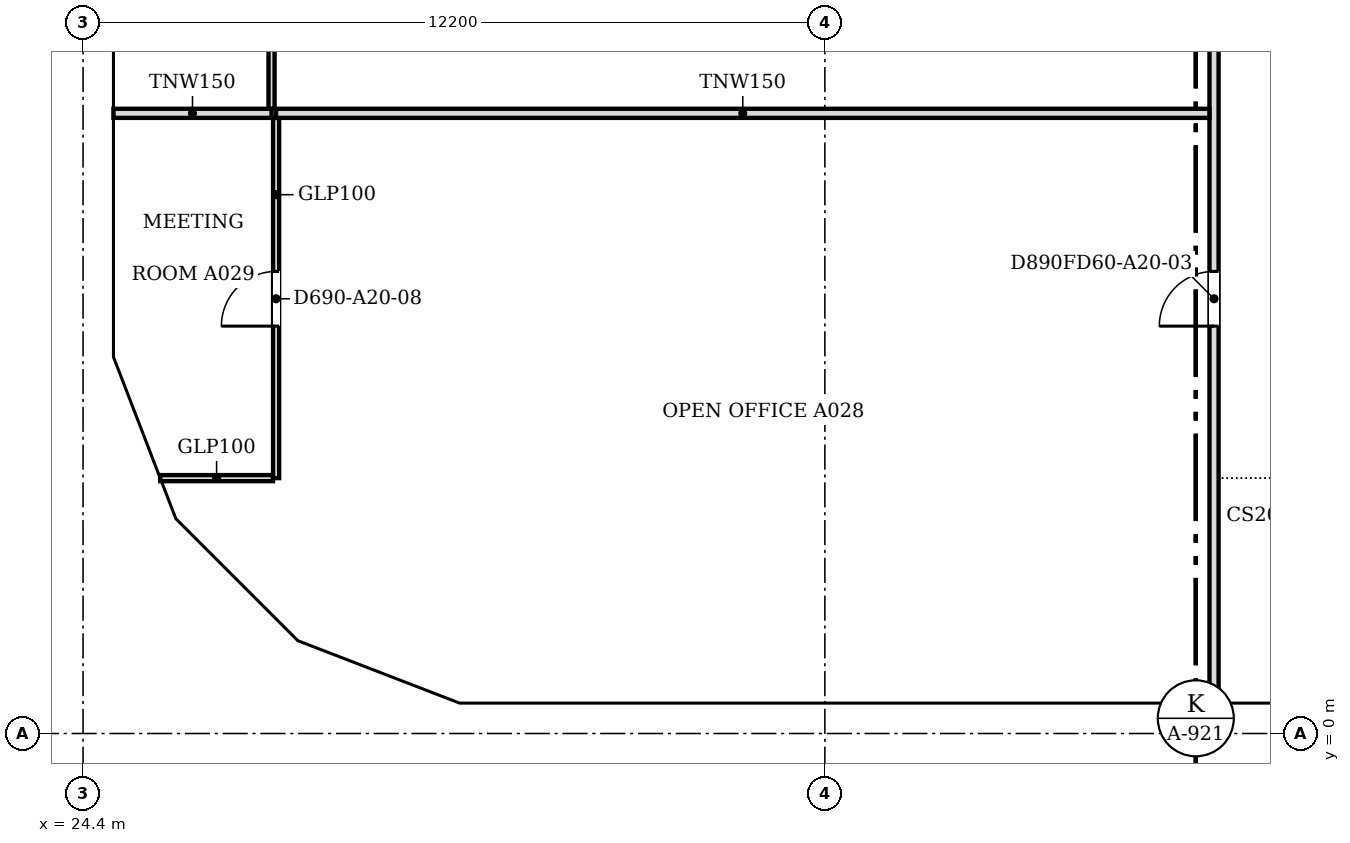
"""IFC4 building model, lengths in metres.
Left out: names, types, materials, properties, quantities, classifications, styles, units other than length and angle.
Written with IfcOpenShell. Run it as: python <this file> out.ifc"""

import sys

from ifc_helpers import new_model, si_unit, direction, frame, frame_2d, origin, place, context, subcontext, project, spatial, polyline, rectangle, outline, extrude, faceted_brep, source, transform, mapped, element, fill, save


model = new_model("IFC4")
c1 = context("Model", 3, precision=1e-05, world=origin(), true_north=direction((0.0, 1.0)))
c2 = subcontext(c1, "Body", "Model", "MODEL_VIEW")
j1 = project(units=[si_unit("LENGTHUNIT", "METRE"), si_unit("PLANEANGLEUNIT", "RADIAN")], contexts=[c1])
p1 = place(None, origin())
s1 = spatial("IfcSite", under=j1, at=p1, CompositionType="ELEMENT")
p2 = place(p1, origin())
s2 = spatial("IfcBuilding", under=s1, at=p2, CompositionType="ELEMENT")
p3 = place(p2, frame((0.0, 0.0, 220.7)))
s3 = spatial("IfcBuildingStorey", under=s2, at=p3, CompositionType="ELEMENT", Elevation=220.7)
m1 = source(origin(), c2, "Body", "Brep", [
    faceted_brep([(0.047, -0.25, 0.0), (3.05, -0.25, 3.8), (0.047, -0.25, 7.6), (0.0, -0.25, 7.54), (0.0, -0.25, 0.06), (0.093, 0.25, 7.541), (3.05, 0.25, 3.8), (0.093, 0.25, 0.059), (0.047, 0.0, 0.0), (0.047, 0.0, 7.6)], [[[0, 1, 2, 3, 4]], [[5, 6, 7]], [[7, 6, 1, 0, 8]], [[6, 5, 9, 2, 1]], [[3, 2, 9]], [[8, 0, 4]], [[7, 8, 4, 3, 9, 5]]]),
])
p4 = place(p3, frame((30.5, 0.25, -3.8), z_axis=(0.0, 0.0, 1.0), x_axis=(1.0, 0.0, 0.0)))
e1 = element("IfcWall", 1, at=p4, inside=s3, PredefinedType="SOLIDWALL", context=c2, shape_type="MappedRepresentation", body=[
    mapped(m1, transform((0.0, 0.0, 0.0), scale=1.0)),
])
m2 = source(origin(), c2, "Body", "SweptSolid", [
    extrude(outline(polyline([(0.247, 0.656), (2.731, 3.8), (0.247, 6.944), (0.247, 0.656)])), frame((0.0, 0.26, 0.0), z_axis=(0.0, -1.0, 0.0), x_axis=(1.0, 0.0, 0.0)), (0.0, 0.0, 1.0), 0.52),
])
p5 = place(p4, origin())
e2 = element("IfcOpeningElement", 2, at=p5, cuts=e1, PredefinedType="OPENING", context=c2, shape_type="MappedRepresentation", body=[
    mapped(m2, transform((0.0, 0.0, 0.0), scale=1.0)),
])
m3 = source(origin(), c2, "Body", "Brep", [
    faceted_brep([(2.95, -0.25, 0.0), (2.997, -0.25, 0.059), (2.997, -0.25, 7.541), (2.95, -0.25, 7.6), (0.0, -0.25, 3.8), (0.053, 0.25, 3.868), (2.904, 0.25, 7.54), (2.904, 0.25, 0.06), (0.053, 0.25, 3.732), (2.95, 0.0, 0.0), (2.95, 0.0, 7.6), (0.0, 0.0, 3.8)], [[[0, 1, 2, 3, 4]], [[5, 6, 7, 8]], [[1, 0, 9]], [[10, 3, 2]], [[6, 5, 11, 4, 3, 10]], [[8, 7, 9, 0, 4, 11]], [[8, 11, 5]], [[1, 9, 7, 6, 10, 2]]]),
])
p6 = place(p3, frame((27.794, 1.312, -3.8), z_axis=(0.0, 0.0, 1.0), x_axis=(0.932973525033, -0.359944998003, 0.0)))
e3 = element("IfcWall", 3, at=p6, inside=s3, PredefinedType="SOLIDWALL", context=c2, shape_type="MappedRepresentation", body=[
    mapped(m3, transform((0.0, 0.0, 0.0), scale=1.0)),
])
m4 = source(origin(), c2, "Body", "SweptSolid", [
    extrude(outline(polyline([(2.75, 6.935), (0.316, 3.8), (2.75, 0.665), (2.75, 6.935)])), frame((0.0, 0.26, 0.0), z_axis=(0.0, -1.0, 0.0), x_axis=(1.0, 0.0, 0.0)), (0.0, 0.0, 1.0), 0.52),
])
p7 = place(p6, origin())
e4 = element("IfcOpeningElement", 4, at=p7, cuts=e3, PredefinedType="OPENING", context=c2, shape_type="MappedRepresentation", body=[
    mapped(m4, transform((0.0, 0.0, 0.0), scale=1.0)),
])
m5 = source(origin(), c2, "Body", "Brep", [
    faceted_brep([(3.05, -0.25, 0.0), (6.1, -0.25, 3.8), (6.1, -0.25, 3.8), (3.05, -0.25, 7.6), (0.0, -0.25, 3.8), (0.0, 0.25, 3.8), (3.05, 0.25, 7.6), (6.1, 0.25, 3.8), (6.1, 0.25, 3.8), (3.05, 0.25, 0.0)], [[[0, 1, 2, 3, 4]], [[5, 6, 7, 8, 9]], [[9, 8, 1, 0]], [[7, 6, 3, 2]], [[6, 5, 4, 3]], [[5, 9, 0, 4]], [[1, 8, 7, 2]]]),
])
p8 = place(p3, frame((33.55, 0.25, -3.8), z_axis=(0.0, 0.0, 1.0), x_axis=(1.0, 0.0, 0.0)))
e5 = element("IfcWall", 5, at=p8, inside=s3, PredefinedType="SOLIDWALL", context=c2, shape_type="MappedRepresentation", body=[
    mapped(m5, transform((0.0, 0.0, 0.0), scale=1.0)),
])
m6 = source(origin(), c2, "Body", "SweptSolid", [
    extrude(outline(polyline([(3.05, 0.399), (5.78, 3.8), (3.05, 7.201), (0.321, 3.8), (3.05, 0.399)])), frame((0.0, 0.26, 0.0), z_axis=(0.0, -1.0, 0.0), x_axis=(1.0, 0.0, 0.0)), (0.0, 0.0, 1.0), 0.52),
])
p9 = place(p8, origin())
e6 = element("IfcOpeningElement", 6, at=p9, cuts=e5, PredefinedType="OPENING", context=c2, shape_type="MappedRepresentation", body=[
    mapped(m6, transform((0.0, 0.0, 0.0), scale=1.0)),
])
m7 = source(origin(), c2, "Body", "SweptSolid", [
    extrude(outline(polyline([(3.05, 0.0), (6.1, 3.8), (3.05, 7.6), (0.0, 3.8), (3.05, 0.0)])), frame((0.0, 0.25, 0.0), z_axis=(0.0, -1.0, 0.0), x_axis=(1.0, 0.0, 0.0)), (0.0, 0.0, 1.0), 0.5),
])
p10 = place(p3, frame((39.65, 0.25, -3.8), z_axis=(0.0, 0.0, 1.0), x_axis=(1.0, 0.0, 0.0)))
e7 = element("IfcWall", 7, at=p10, inside=s3, PredefinedType="SOLIDWALL", context=c2, shape_type="MappedRepresentation", body=[
    mapped(m7, transform((0.0, 0.0, 0.0), scale=1.0)),
])
p11 = place(p10, origin())
e8 = element("IfcOpeningElement", 8, at=p11, cuts=e7, PredefinedType="OPENING", context=c2, shape_type="MappedRepresentation", body=[
    mapped(m6, transform((0.0, 0.0, 0.0), scale=1.0)),
])
m8 = source(origin(), c2, "Body", "Brep", [
    faceted_brep([(3.096, -0.25, 0.0), (6.1, -0.25, 3.8), (3.096, -0.25, 7.6), (0.047, -0.25, 3.857), (0.047, -0.25, 3.743), (0.0, 0.25, 3.8), (3.096, 0.25, 7.6), (6.053, 0.25, 3.859), (6.053, 0.25, 3.741), (3.096, 0.25, 0.0), (6.1, -0.0, 3.8), (0.0, 0.0, 3.8)], [[[0, 1, 2, 3, 4]], [[5, 6, 7, 8, 9]], [[9, 8, 10, 1, 0]], [[7, 6, 2, 1, 10]], [[6, 5, 11, 3, 2]], [[5, 9, 0, 4, 11]], [[11, 4, 3]], [[10, 8, 7]]]),
])
p12 = place(p3, frame((24.65, 12.247, -3.8), z_axis=(0.0, 0.0, 1.0), x_axis=(0.0, -1.0, 0.0)))
e9 = element("IfcWall", 9, at=p12, inside=s3, PredefinedType="SOLIDWALL", context=c2, shape_type="MappedRepresentation", body=[
    mapped(m8, transform((0.0, 0.0, 0.0), scale=1.0)),
])
m9 = source(origin(), c2, "Body", "SweptSolid", [
    extrude(outline(polyline([(3.094, 0.399), (5.781, 3.8), (3.094, 7.201), (0.323, 3.8), (3.094, 0.399)])), frame((0.0, 0.26, 0.0), z_axis=(0.0, -1.0, 0.0), x_axis=(1.0, 0.0, 0.0)), (0.0, 0.0, 1.0), 0.52),
])
p13 = place(p12, origin())
e10 = element("IfcOpeningElement", 10, at=p13, cuts=e9, PredefinedType="OPENING", context=c2, shape_type="MappedRepresentation", body=[
    mapped(m9, transform((0.0, 0.0, 0.0), scale=1.0)),
])
m10 = source(origin(), c2, "Body", "Brep", [
    faceted_brep([(2.95, -0.25, 0.0), (3.003, -0.25, 0.068), (3.003, -0.25, 7.532), (2.95, -0.25, 7.6), (0.0, -0.25, 3.8), (0.047, 0.25, 3.86), (2.898, 0.25, 7.532), (2.898, 0.25, 0.068), (0.047, 0.25, 3.74), (2.95, 0.0, 0.0), (2.95, 0.0, 7.6), (0.0, 0.0, 3.8)], [[[0, 1, 2, 3, 4]], [[5, 6, 7, 8]], [[1, 0, 9]], [[10, 3, 2]], [[6, 5, 11, 4, 3, 10]], [[8, 7, 9, 0, 4, 11]], [[8, 11, 5]], [[1, 9, 7, 6, 10, 2]]]),
])
p14 = place(p3, frame((24.65, 6.146, -3.8), z_axis=(0.0, 0.0, 1.0), x_axis=(0.359953949349, -0.932970071518, 0.0)))
e11 = element("IfcWall", 11, at=p14, inside=s3, PredefinedType="SOLIDWALL", context=c2, shape_type="MappedRepresentation", body=[
    mapped(m10, transform((0.0, 0.0, 0.0), scale=1.0)),
])
p15 = place(p14, origin())
e12 = element("IfcOpeningElement", 12, at=p15, cuts=e11, PredefinedType="OPENING", context=c2, shape_type="MappedRepresentation", body=[
    mapped(m4, transform((0.0, 0.0, 0.0), scale=1.0)),
])
m11 = source(origin(), c2, "Body", "Brep", [
    faceted_brep([(0.053, -0.25, 0.0), (2.997, -0.25, 3.8), (0.053, -0.25, 7.6), (0.0, -0.25, 7.532), (0.0, -0.25, 0.068), (0.106, 0.25, 7.532), (2.944, 0.25, 3.868), (2.944, 0.25, 3.732), (0.106, 0.25, 0.068), (2.997, 0.0, 3.8), (0.053, 0.0, 0.0), (0.053, 0.0, 7.6)], [[[0, 1, 2, 3, 4]], [[5, 6, 7, 8]], [[8, 7, 9, 1, 0, 10]], [[6, 5, 11, 2, 1, 9]], [[3, 2, 11]], [[10, 0, 4]], [[8, 10, 4, 3, 11, 5]], [[9, 7, 6]]]),
])
p16 = place(p3, frame((25.675, 3.431, -3.8), z_axis=(0.0, 0.0, 1.0), x_axis=(0.707106781187, -0.707106781187, 0.0)))
e13 = element("IfcWall", 13, at=p16, inside=s3, PredefinedType="SOLIDWALL", context=c2, shape_type="MappedRepresentation", body=[
    mapped(m11, transform((0.0, 0.0, 0.0), scale=1.0)),
])
m12 = source(origin(), c2, "Body", "SweptSolid", [
    extrude(outline(polyline([(0.253, 0.667), (2.681, 3.8), (0.253, 6.934), (0.253, 0.667)])), frame((0.0, 0.26, 0.0), z_axis=(0.0, -1.0, 0.0), x_axis=(1.0, 0.0, 0.0)), (0.0, 0.0, 1.0), 0.52),
])
p17 = place(p16, origin())
e14 = element("IfcOpeningElement", 14, at=p17, cuts=e13, PredefinedType="OPENING", context=c2, shape_type="MappedRepresentation", body=[
    mapped(m12, transform((0.0, 0.0, 0.0), scale=1.0)),
])
p18 = place(p2, frame((0.0, 0.0, 224.5)))
s4 = spatial("IfcBuildingStorey", under=s2, at=p18, CompositionType="ELEMENT", Elevation=224.5)
m13 = source(origin(), c2, "Body", "Brep", [
    faceted_brep([(3.003, -0.25, 0.0), (6.053, -0.25, 3.8), (3.003, -0.25, 7.6), (0.0, -0.25, 3.8), (0.047, 0.25, 3.859), (3.003, 0.25, 7.6), (6.053, 0.25, 3.8), (3.003, 0.25, 0.0), (0.047, 0.25, 3.741), (0.0, 0.0, 3.8)], [[[0, 1, 2, 3]], [[4, 5, 6, 7, 8]], [[7, 6, 1, 0]], [[6, 5, 2, 1]], [[5, 4, 9, 3, 2]], [[8, 7, 0, 3, 9]], [[8, 9, 4]]]),
])
p19 = place(p18, frame((30.547, 0.25, -3.8), z_axis=(0.0, 0.0, 1.0), x_axis=(1.0, 0.0, 0.0)))
e15 = element("IfcWall", 15, at=p19, inside=s4, PredefinedType="SOLIDWALL", context=c2, shape_type="MappedRepresentation", body=[
    mapped(m13, transform((0.0, 0.0, 0.0), scale=1.0)),
])
m14 = source(origin(), c2, "Body", "SweptSolid", [
    extrude(outline(polyline([(3.005, 0.401), (5.733, 3.8), (3.005, 7.199), (0.319, 3.8), (3.005, 0.401)])), frame((0.0, 0.26, 0.0), z_axis=(0.0, -1.0, 0.0), x_axis=(1.0, 0.0, 0.0)), (0.0, 0.0, 1.0), 0.52),
])
p20 = place(p19, origin())
e16 = element("IfcOpeningElement", 16, at=p20, cuts=e15, PredefinedType="OPENING", context=c2, shape_type="MappedRepresentation", body=[
    mapped(m14, transform((0.0, 0.0, 0.0), scale=1.0)),
])
p21 = place(p18, frame((36.6, 0.25, -3.8), z_axis=(0.0, 0.0, 1.0), x_axis=(1.0, 0.0, 0.0)))
e17 = element("IfcWall", 17, at=p21, inside=s4, PredefinedType="SOLIDWALL", context=c2, shape_type="MappedRepresentation", body=[
    mapped(m5, transform((0.0, 0.0, 0.0), scale=1.0)),
])
p22 = place(p21, origin())
e18 = element("IfcOpeningElement", 18, at=p22, cuts=e17, PredefinedType="OPENING", context=c2, shape_type="MappedRepresentation", body=[
    mapped(m6, transform((0.0, 0.0, 0.0), scale=1.0)),
])
p23 = place(p18, frame((42.7, 0.25, -3.8), z_axis=(0.0, 0.0, 1.0), x_axis=(1.0, 0.0, 0.0)))
e19 = element("IfcWall", 19, at=p23, inside=s4, PredefinedType="SOLIDWALL", context=c2, shape_type="MappedRepresentation", body=[
    mapped(m7, transform((0.0, 0.0, 0.0), scale=1.0)),
])
p24 = place(p23, origin())
e20 = element("IfcOpeningElement", 20, at=p24, cuts=e19, PredefinedType="OPENING", context=c2, shape_type="MappedRepresentation", body=[
    mapped(m6, transform((0.0, 0.0, 0.0), scale=1.0)),
])
m15 = source(origin(), c2, "Body", "Brep", [
    faceted_brep([(0.093, -0.25, 0.057), (3.143, -0.25, 3.8), (0.093, -0.25, 7.543), (0.0, 0.25, 7.544), (0.047, 0.25, 7.6), (3.143, 0.25, 3.8), (0.047, 0.25, 0.0), (0.0, 0.25, 0.056), (0.047, 0.0, 0.0), (0.047, 0.0, 7.6)], [[[0, 1, 2]], [[3, 4, 5, 6, 7]], [[6, 5, 1, 0, 8]], [[5, 4, 9, 2, 1]], [[4, 3, 9]], [[7, 6, 8]], [[7, 8, 0, 2, 9, 3]]]),
])
p25 = place(p18, frame((24.65, 12.293, -3.8), z_axis=(0.0, 0.0, 1.0), x_axis=(0.0, -1.0, 0.0)))
e21 = element("IfcWall", 21, at=p25, inside=s4, PredefinedType="SOLIDWALL", context=c2, shape_type="MappedRepresentation", body=[
    mapped(m15, transform((0.0, 0.0, 0.0), scale=1.0)),
])
m16 = source(origin(), c2, "Body", "SweptSolid", [
    extrude(outline(polyline([(0.247, 0.641), (2.821, 3.8), (0.247, 6.959), (0.247, 0.641)])), frame((0.0, 0.26, 0.0), z_axis=(0.0, -1.0, 0.0), x_axis=(1.0, 0.0, 0.0)), (0.0, 0.0, 1.0), 0.52),
])
p26 = place(p25, origin())
e22 = element("IfcOpeningElement", 22, at=p26, cuts=e21, PredefinedType="OPENING", context=c2, shape_type="MappedRepresentation", body=[
    mapped(m16, transform((0.0, 0.0, 0.0), scale=1.0)),
])
m17 = source(origin(), c2, "Body", "Brep", [
    faceted_brep([(3.003, -0.25, 0.0), (3.05, -0.25, 0.06), (3.05, -0.25, 7.54), (3.003, -0.25, 7.6), (0.0, -0.25, 3.8), (0.0, 0.25, 3.8), (2.957, 0.25, 7.541), (2.957, 0.25, 0.059), (3.003, 0.0, 0.0), (3.003, 0.0, 7.6)], [[[0, 1, 2, 3, 4]], [[5, 6, 7]], [[1, 0, 8]], [[9, 3, 2]], [[6, 5, 4, 3, 9]], [[5, 7, 8, 0, 4]], [[1, 8, 7, 6, 9, 2]]]),
])
p27 = place(p18, frame((24.65, 9.15, -3.8), z_axis=(0.0, 0.0, 1.0), x_axis=(0.0, -1.0, 0.0)))
e23 = element("IfcWall", 23, at=p27, inside=s4, PredefinedType="SOLIDWALL", context=c2, shape_type="MappedRepresentation", body=[
    mapped(m17, transform((0.0, 0.0, 0.0), scale=1.0)),
])
m18 = source(origin(), c2, "Body", "SweptSolid", [
    extrude(outline(polyline([(2.803, 6.944), (0.319, 3.8), (2.803, 0.656), (2.803, 6.944)])), frame((0.0, 0.26, 0.0), z_axis=(0.0, -1.0, 0.0), x_axis=(1.0, 0.0, 0.0)), (0.0, 0.0, 1.0), 0.52),
])
p28 = place(p27, origin())
e24 = element("IfcOpeningElement", 24, at=p28, cuts=e23, PredefinedType="OPENING", context=c2, shape_type="MappedRepresentation", body=[
    mapped(m18, transform((0.0, 0.0, 0.0), scale=1.0)),
])
m19 = source(origin(), c2, "Body", "Brep", [
    faceted_brep([(0.047, -0.25, 0.0), (2.997, -0.25, 3.8), (0.047, -0.25, 7.6), (0.0, -0.25, 7.541), (0.0, -0.25, 0.059), (0.093, 0.25, 7.54), (2.944, 0.25, 3.868), (2.944, 0.25, 3.732), (0.093, 0.25, 0.06), (2.997, 0.0, 3.8), (0.047, 0.0, 0.0), (0.047, 0.0, 7.6)], [[[0, 1, 2, 3, 4]], [[5, 6, 7, 8]], [[8, 7, 9, 1, 0, 10]], [[6, 5, 11, 2, 1, 9]], [[3, 2, 11]], [[10, 0, 4]], [[8, 10, 4, 3, 11, 5]], [[9, 7, 6]]]),
])
p29 = place(p18, frame((24.633, 6.19, -3.8), z_axis=(0.0, 0.0, 1.0), x_axis=(0.359901446078, -0.932990326376, 0.0)))
e25 = element("IfcWall", 25, at=p29, inside=s4, PredefinedType="SOLIDWALL", context=c2, shape_type="MappedRepresentation", body=[
    mapped(m19, transform((0.0, 0.0, 0.0), scale=1.0)),
])
m20 = source(origin(), c2, "Body", "SweptSolid", [
    extrude(outline(polyline([(0.247, 0.665), (2.681, 3.8), (0.247, 6.935), (0.247, 0.665)])), frame((0.0, 0.26, 0.0), z_axis=(0.0, -1.0, 0.0), x_axis=(1.0, 0.0, 0.0)), (0.0, 0.0, 1.0), 0.52),
])
p30 = place(p29, origin())
e26 = element("IfcOpeningElement", 26, at=p30, cuts=e25, PredefinedType="OPENING", context=c2, shape_type="MappedRepresentation", body=[
    mapped(m20, transform((0.0, 0.0, 0.0), scale=1.0)),
])
m21 = source(origin(), c2, "Body", "Brep", [
    faceted_brep([(2.944, -0.25, 0.0), (2.997, -0.25, 0.068), (2.997, -0.25, 7.532), (2.944, -0.25, 7.6), (0.0, -0.25, 3.8), (0.053, 0.25, 3.868), (2.891, 0.25, 7.532), (2.891, 0.25, 0.068), (0.053, 0.25, 3.732), (2.944, 0.0, 0.0), (2.944, 0.0, 7.6), (0.0, 0.0, 3.8)], [[[0, 1, 2, 3, 4]], [[5, 6, 7, 8]], [[1, 0, 9]], [[10, 3, 2]], [[6, 5, 11, 4, 3, 10]], [[8, 7, 9, 0, 4, 11]], [[8, 11, 5]], [[1, 9, 7, 6, 10, 2]]]),
])
p31 = place(p18, frame((25.712, 3.394, -3.8), z_axis=(0.0, 0.0, 1.0), x_axis=(0.707066050402, -0.707147509625, 0.0)))
e27 = element("IfcWall", 27, at=p31, inside=s4, PredefinedType="SOLIDWALL", context=c2, shape_type="MappedRepresentation", body=[
    mapped(m21, transform((0.0, 0.0, 0.0), scale=1.0)),
])
m22 = source(origin(), c2, "Body", "SweptSolid", [
    extrude(outline(polyline([(2.744, 6.934), (0.316, 3.8), (2.744, 0.666), (2.744, 6.934)])), frame((0.0, 0.26, 0.0), z_axis=(0.0, -1.0, 0.0), x_axis=(1.0, 0.0, 0.0)), (0.0, 0.0, 1.0), 0.52),
])
p32 = place(p31, origin())
e28 = element("IfcOpeningElement", 28, at=p32, cuts=e27, PredefinedType="OPENING", context=c2, shape_type="MappedRepresentation", body=[
    mapped(m22, transform((0.0, 0.0, 0.0), scale=1.0)),
])
m23 = source(origin(), c2, "Body", "Brep", [
    faceted_brep([(0.053, -0.25, 0.0), (3.003, -0.25, 3.8), (0.053, -0.25, 7.6), (0.0, -0.25, 7.532), (0.0, -0.25, 0.068), (0.106, 0.25, 7.532), (2.957, 0.25, 3.86), (2.957, 0.25, 3.74), (0.106, 0.25, 0.068), (3.003, 0.0, 3.8), (0.053, 0.0, 0.0), (0.053, 0.0, 7.6)], [[[0, 1, 2, 3, 4]], [[5, 6, 7, 8]], [[8, 7, 9, 1, 0, 10]], [[6, 5, 11, 2, 1, 9]], [[3, 2, 11]], [[10, 0, 4]], [[8, 10, 4, 3, 11, 5]], [[9, 7, 6]]]),
])
p33 = place(p18, frame((27.744, 1.331, -3.8), z_axis=(0.0, 0.0, 1.0), x_axis=(0.932970071518, -0.359953949349, 0.0)))
e29 = element("IfcWall", 29, at=p33, inside=s4, PredefinedType="SOLIDWALL", context=c2, shape_type="MappedRepresentation", body=[
    mapped(m23, transform((0.0, 0.0, 0.0), scale=1.0)),
])
m24 = source(origin(), c2, "Body", "SweptSolid", [
    extrude(outline(polyline([(0.253, 0.665), (2.687, 3.8), (0.253, 6.935), (0.253, 0.665)])), frame((0.0, 0.26, 0.0), z_axis=(0.0, -1.0, 0.0), x_axis=(1.0, 0.0, 0.0)), (0.0, 0.0, 1.0), 0.52),
])
p34 = place(p33, origin())
e30 = element("IfcOpeningElement", 30, at=p34, cuts=e29, PredefinedType="OPENING", context=c2, shape_type="MappedRepresentation", body=[
    mapped(m24, transform((0.0, 0.0, 0.0), scale=1.0)),
])
p35 = place(p3, frame((43.0, 0.5, 0.0), z_axis=(0.0, 0.0, 1.0), x_axis=(0.0, 1.0, 0.0)))
e31 = element("IfcWall", 31, at=p35, inside=s3, PredefinedType="PARTITIONING", context=c2, shape_type="SweptSolid", body=[
    extrude(rectangle(XDim=21.424, YDim=0.15, at=frame_2d((10.712, 0.0))), origin(), (0.0, 0.0, 1.0), 3.067),
])
m25 = source(origin(), c2, "Body", "SweptSolid", [
    extrude(rectangle(XDim=0.9, YDim=2.1, at=frame_2d((0.45, 1.05))), frame((0.0, 0.085, 0.0), z_axis=(0.0, -1.0, 0.0), x_axis=(1.0, 0.0, 0.0)), (0.0, 0.0, 1.0), 0.17),
])
p36 = place(p35, frame((6.2, 0.0, 0.0)))
e32 = element("IfcOpeningElement", 32, at=p36, cuts=e31, PredefinedType="OPENING", context=c2, shape_type="MappedRepresentation", body=[
    mapped(m25, transform((0.0, 0.0, 0.0), scale=1.0)),
])
p37 = place(p35, frame((15.1, 0.0, 0.0)))
e33 = element("IfcOpeningElement", 33, at=p37, cuts=e31, PredefinedType="OPENING", context=c2, shape_type="MappedRepresentation", body=[
    mapped(m25, transform((0.0, 0.0, 0.0), scale=1.0)),
])
p38 = place(p3, frame((25.669, 4.2, 0.0), z_axis=(0.0, 0.0, 1.0), x_axis=(1.0, 0.0, 0.0)))
e34 = element("IfcWall", 34, at=p38, inside=s3, PredefinedType="PARTITIONING", context=c2, shape_type="SweptSolid", body=[
    extrude(rectangle(XDim=1.855, YDim=0.1, at=frame_2d((0.928, 0.0))), origin(), (0.0, 0.0, 1.0), 3.067),
])
p39 = place(p3, frame((27.575, 4.2, 0.0), z_axis=(0.0, 0.0, 1.0), x_axis=(0.0, 1.0, 0.0)))
e35 = element("IfcWall", 35, at=p39, inside=s3, PredefinedType="PARTITIONING", context=c2, shape_type="SweptSolid", body=[
    extrude(rectangle(XDim=5.924, YDim=0.1, at=frame_2d((2.962, 0.0))), origin(), (0.0, 0.0, 1.0), 3.067),
])
m26 = source(origin(), c2, "Body", "SweptSolid", [
    extrude(rectangle(XDim=0.9, YDim=2.1, at=frame_2d((0.45, 1.05))), frame((0.0, 0.06, 0.0), z_axis=(0.0, -1.0, 0.0), x_axis=(1.0, 0.0, 0.0)), (0.0, 0.0, 1.0), 0.12),
])
p40 = place(p39, frame((2.5, 0.0, 0.0)))
e36 = element("IfcOpeningElement", 36, at=p40, cuts=e35, PredefinedType="OPENING", context=c2, shape_type="MappedRepresentation", body=[
    mapped(m26, transform((0.0, 0.0, 0.0), scale=1.0)),
])
p41 = place(p3, frame((24.9, 10.2, 0.0), z_axis=(0.0, 0.0, 1.0), x_axis=(1.0, 0.0, 0.0)))
e37 = element("IfcWall", 37, at=p41, inside=s3, PredefinedType="PARTITIONING", context=c2, shape_type="SweptSolid", body=[
    extrude(rectangle(XDim=2.6, YDim=0.15, at=frame_2d((1.3, 0.0))), origin(), (0.0, 0.0, 1.0), 3.067),
])
p42 = place(p3, frame((27.575, 10.2, 0.0), z_axis=(0.0, 0.0, 1.0), x_axis=(1.0, 0.0, 0.0)))
e38 = element("IfcWall", 38, at=p42, inside=s3, PredefinedType="PARTITIONING", context=c2, shape_type="SweptSolid", body=[
    extrude(rectangle(XDim=15.349, YDim=0.15, at=frame_2d((7.675, 0.0))), origin(), (0.0, 0.0, 1.0), 3.067),
])
p43 = place(p3, frame((27.5, 10.276, 0.0), z_axis=(0.0, 0.0, 1.0), x_axis=(0.0, 1.0, 0.0)))
e39 = element("IfcWall", 39, at=p43, inside=s3, PredefinedType="PARTITIONING", context=c2, shape_type="SweptSolid", body=[
    extrude(rectangle(XDim=8.448, YDim=0.1, at=frame_2d((4.224, 0.0))), origin(), (0.0, 0.0, 1.0), 3.067),
])
p44 = place(p43, frame((3.8, 0.0, 0.0)))
e40 = element("IfcOpeningElement", 40, at=p44, cuts=e39, PredefinedType="OPENING", context=c2, shape_type="MappedRepresentation", body=[
    mapped(m26, transform((0.0, 0.0, 0.0), scale=1.0)),
])
m27 = source(origin(), c2, "Body", "SweptSolid", [
    extrude(rectangle(XDim=0.9, YDim=2.1, at=frame_2d((0.45, 1.05))), frame((0.0, 0.025, 0.0), z_axis=(0.0, -1.0, 0.0), x_axis=(1.0, 0.0, 0.0)), (0.0, 0.0, 1.0), 0.05),
])
p45 = place(p36, origin())
e41 = element("IfcDoor", 41, at=p45, inside=s3, OperationType="SINGLE_SWING_LEFT", PredefinedType="DOOR", context=c2, shape_type="MappedRepresentation", body=[
    mapped(m27, transform((0.0, 0.0, 0.0), scale=1.0)),
])
fill(e32, e41)
p46 = place(p40, origin())
e42 = element("IfcDoor", 42, at=p46, inside=s3, OperationType="SINGLE_SWING_LEFT", PredefinedType="DOOR", context=c2, shape_type="MappedRepresentation", body=[
    mapped(m27, transform((0.0, 0.0, 0.0), scale=1.0)),
])
fill(e36, e42)
save(model, sys.argv[1])
